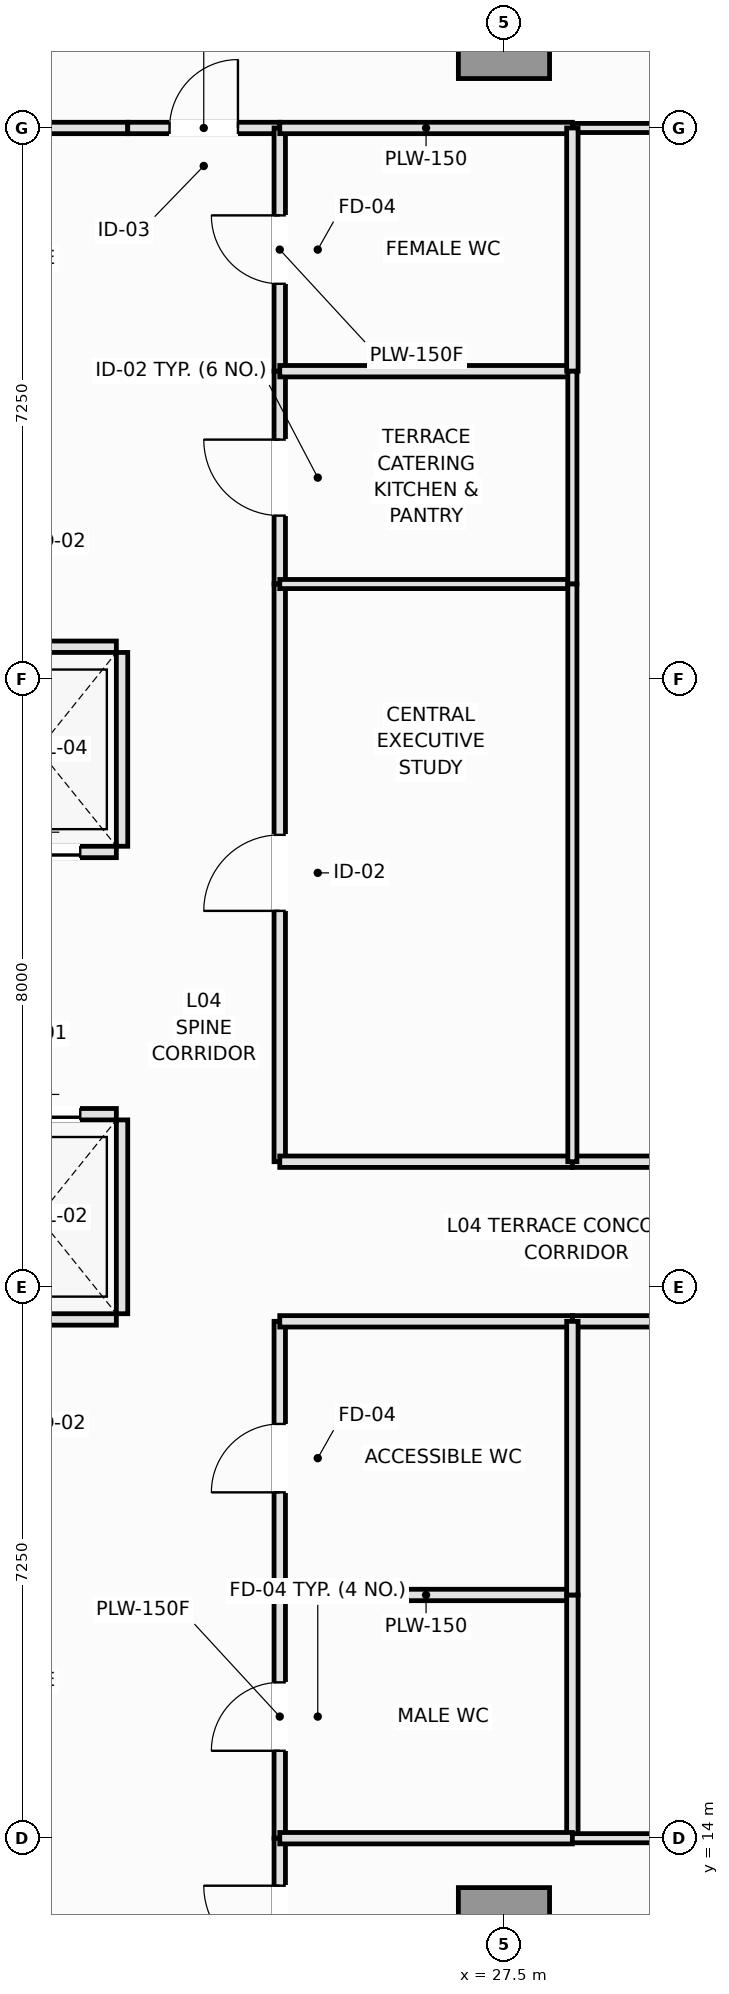
"""IFC4 building model, lengths in metres.
Left out: names, types, materials, properties, quantities, classifications, styles, units other than length and angle.
Written with IfcOpenShell. Run it as: python <this file> out.ifc"""

import sys

from ifc_helpers import new_model, si_unit, direction, frame, frame_2d, origin, origin_2d, place, context, subcontext, project, spatial, rectangle, extrude, element, fill, save


model = new_model("IFC4")
c1 = context("Model", 3, precision=1e-05, world=origin(), true_north=direction((0.0, 1.0)))
c2 = subcontext(c1, "Body", "Model", "MODEL_VIEW")
j1 = project(units=[si_unit("LENGTHUNIT", "METRE"), si_unit("PLANEANGLEUNIT", "RADIAN")], contexts=[c1])
p1 = place(None, origin())
s1 = spatial("IfcSite", under=j1, at=p1, CompositionType="ELEMENT")
p2 = place(p1, origin())
s2 = spatial("IfcBuilding", under=s1, at=p2, CompositionType="ELEMENT")
p3 = place(p2, frame((0.0, 0.0, 20.4)))
s3 = spatial("IfcBuildingStorey", under=s2, at=p3, CompositionType="ELEMENT", Elevation=20.4)
for number, where, z_axis, x_axis in (
    (1, (27.5, 12.75, 0.0), (0.0, 0.0, 1.0), (1.0, 0.0, 0.0)),
    (2, (27.5, 37.75, 0.0), (0.0, 0.0, 1.0), (1.0, 0.0, 0.0)),
):
    element("IfcColumn", number, at=place(p3, frame(where, z_axis=z_axis, x_axis=x_axis)), inside=s3, PredefinedType="COLUMN", context=c2, shape_type="SweptSolid", body=[
        extrude(rectangle(XDim=1.2, YDim=1.2, at=origin_2d()), origin(), (0.0, 0.0, 1.0), 5.2),
    ])
p4 = place(p3, frame((20.35, 20.825, 0.0), z_axis=(0.0, 0.0, 1.0), x_axis=(1.0, 0.0, 0.0)))
e3 = element("IfcWall", 3, at=p4, inside=s3, PredefinedType="PARTITIONING", context=c2, shape_type="SweptSolid", body=[
    extrude(rectangle(XDim=2.05, YDim=0.15, at=frame_2d((1.025, 0.0))), origin(), (0.0, 0.0, 1.0), 5.02),
])
p5 = place(p3, frame((20.35, 23.525, 0.0), z_axis=(0.0, 0.0, 1.0), x_axis=(1.0, 0.0, 0.0)))
e4 = element("IfcWall", 4, at=p5, inside=s3, PredefinedType="PARTITIONING", context=c2, shape_type="SweptSolid", body=[
    extrude(rectangle(XDim=2.05, YDim=0.15, at=frame_2d((1.025, 0.0))), origin(), (0.0, 0.0, 1.0), 5.02),
])
p6 = place(p5, frame((0.475, 0.0, 0.0)))
e5 = element("IfcOpeningElement", 5, at=p6, cuts=e4, PredefinedType="OPENING", context=c2, shape_type="SweptSolid", body=[
    extrude(rectangle(XDim=1.1, YDim=2.2, at=frame_2d((0.55, 1.1))), frame((0.0, 0.085, 0.0), z_axis=(0.0, -1.0, 0.0), x_axis=(1.0, 0.0, 0.0)), (0.0, 0.0, 1.0), 0.17),
])
p7 = place(p3, frame((22.475, 20.9, 0.0), z_axis=(0.0, 0.0, 1.0), x_axis=(0.0, 1.0, 0.0)))
e6 = element("IfcWall", 6, at=p7, inside=s3, PredefinedType="PARTITIONING", context=c2, shape_type="SweptSolid", body=[
    extrude(rectangle(XDim=2.55, YDim=0.15, at=frame_2d((1.275, 0.0))), origin(), (0.0, 0.0, 1.0), 4.57),
])
p8 = place(p3, frame((20.35, 26.975, 0.0), z_axis=(0.0, 0.0, 1.0), x_axis=(1.0, 0.0, 0.0)))
e7 = element("IfcWall", 7, at=p8, inside=s3, PredefinedType="PARTITIONING", context=c2, shape_type="SweptSolid", body=[
    extrude(rectangle(XDim=2.05, YDim=0.15, at=frame_2d((1.025, 0.0))), origin(), (0.0, 0.0, 1.0), 5.02),
])
p9 = place(p8, frame((0.475, 0.0, 0.0)))
e8 = element("IfcOpeningElement", 8, at=p9, cuts=e7, PredefinedType="OPENING", context=c2, shape_type="SweptSolid", body=[
    extrude(rectangle(XDim=1.1, YDim=2.2, at=frame_2d((0.55, 1.1))), frame((0.0, 0.085, 0.0), z_axis=(0.0, -1.0, 0.0), x_axis=(1.0, 0.0, 0.0)), (0.0, 0.0, 1.0), 0.17),
])
p10 = place(p3, frame((20.35, 29.675, 0.0), z_axis=(0.0, 0.0, 1.0), x_axis=(1.0, 0.0, 0.0)))
e9 = element("IfcWall", 9, at=p10, inside=s3, PredefinedType="PARTITIONING", context=c2, shape_type="SweptSolid", body=[
    extrude(rectangle(XDim=2.05, YDim=0.15, at=frame_2d((1.025, 0.0))), origin(), (0.0, 0.0, 1.0), 5.02),
])
p11 = place(p3, frame((22.475, 27.05, 0.0), z_axis=(0.0, 0.0, 1.0), x_axis=(0.0, 1.0, 0.0)))
e10 = element("IfcWall", 10, at=p11, inside=s3, PredefinedType="PARTITIONING", context=c2, shape_type="SweptSolid", body=[
    extrude(rectangle(XDim=2.55, YDim=0.15, at=frame_2d((1.275, 0.0))), origin(), (0.0, 0.0, 1.0), 4.57),
])
p12 = place(p3, frame((18.0, 36.5, 0.0), z_axis=(0.0, 0.0, 1.0), x_axis=(1.0, 0.0, 0.0)))
e11 = element("IfcWall", 11, at=p12, inside=s3, PredefinedType="PARTITIONING", context=c2, shape_type="SweptSolid", body=[
    extrude(rectangle(XDim=4.55, YDim=0.15, at=frame_2d((2.275, 0.0))), origin(), (0.0, 0.0, 1.0), 5.02),
])
p13 = place(p3, frame((22.55, 36.5, 0.0), z_axis=(0.0, 0.0, 1.0), x_axis=(1.0, 0.0, 0.0)))
e12 = element("IfcWall", 12, at=p13, inside=s3, PredefinedType="PARTITIONING", context=c2, shape_type="SweptSolid", body=[
    extrude(rectangle(XDim=2.0, YDim=0.15, at=frame_2d((1.0, 0.0))), origin(), (0.0, 0.0, 1.0), 5.02),
])
p14 = place(p13, frame((0.55, 0.0, 0.0)))
e13 = element("IfcOpeningElement", 13, at=p14, cuts=e12, PredefinedType="OPENING", context=c2, shape_type="SweptSolid", body=[
    extrude(rectangle(XDim=0.9, YDim=2.1, at=frame_2d((0.45, 1.05))), frame((0.0, 0.085, 0.0), z_axis=(0.0, -1.0, 0.0), x_axis=(1.0, 0.0, 0.0)), (0.0, 0.0, 1.0), 0.17),
])
p15 = place(p3, frame((24.55, 14.0, 0.0), z_axis=(0.0, 0.0, 1.0), x_axis=(0.0, 1.0, 0.0)))
e14 = element("IfcWall", 14, at=p15, inside=s3, PredefinedType="PLUMBINGWALL", context=c2, shape_type="SweptSolid", body=[
    extrude(rectangle(XDim=3.2, YDim=0.15, at=frame_2d((1.6, 0.0))), origin(), (0.0, 0.0, 1.0), 5.02),
])
p16 = place(p15, frame((1.15, 0.0, 0.0)))
e15 = element("IfcOpeningElement", 15, at=p16, cuts=e14, PredefinedType="OPENING", context=c2, shape_type="SweptSolid", body=[
    extrude(rectangle(XDim=0.9, YDim=2.1, at=frame_2d((0.45, 1.05))), frame((0.0, 0.085, 0.0), z_axis=(0.0, -1.0, 0.0), x_axis=(1.0, 0.0, 0.0)), (0.0, 0.0, 1.0), 0.17),
])
p17 = place(p3, frame((24.55, 33.3, 0.0), z_axis=(0.0, 0.0, 1.0), x_axis=(0.0, 1.0, 0.0)))
e16 = element("IfcWall", 16, at=p17, inside=s3, PredefinedType="PLUMBINGWALL", context=c2, shape_type="SweptSolid", body=[
    extrude(rectangle(XDim=3.2, YDim=0.15, at=frame_2d((1.6, 0.0))), origin(), (0.0, 0.0, 1.0), 5.02),
])
p18 = place(p17, frame((1.15, 0.0, 0.0)))
e17 = element("IfcOpeningElement", 17, at=p18, cuts=e16, PredefinedType="OPENING", context=c2, shape_type="SweptSolid", body=[
    extrude(rectangle(XDim=0.9, YDim=2.1, at=frame_2d((0.45, 1.05))), frame((0.0, 0.085, 0.0), z_axis=(0.0, -1.0, 0.0), x_axis=(1.0, 0.0, 0.0)), (0.0, 0.0, 1.0), 0.17),
])
p19 = place(p3, frame((24.55, 17.2, 0.0), z_axis=(0.0, 0.0, 1.0), x_axis=(0.0, 1.0, 0.0)))
e18 = element("IfcWall", 18, at=p19, inside=s3, PredefinedType="PLUMBINGWALL", context=c2, shape_type="SweptSolid", body=[
    extrude(rectangle(XDim=3.6, YDim=0.15, at=frame_2d((1.8, 0.0))), origin(), (0.0, 0.0, 1.0), 5.02),
])
p20 = place(p19, frame((1.35, 0.0, 0.0)))
e19 = element("IfcOpeningElement", 19, at=p20, cuts=e18, PredefinedType="OPENING", context=c2, shape_type="SweptSolid", body=[
    extrude(rectangle(XDim=0.9, YDim=2.1, at=frame_2d((0.45, 1.05))), frame((0.0, 0.085, 0.0), z_axis=(0.0, -1.0, 0.0), x_axis=(1.0, 0.0, 0.0)), (0.0, 0.0, 1.0), 0.17),
])
p21 = place(p3, frame((24.55, 30.5, 0.0), z_axis=(0.0, 0.0, 1.0), x_axis=(0.0, 1.0, 0.0)))
e20 = element("IfcWall", 20, at=p21, inside=s3, PredefinedType="PARTITIONING", context=c2, shape_type="SweptSolid", body=[
    extrude(rectangle(XDim=2.8, YDim=0.15, at=frame_2d((1.4, 0.0))), origin(), (0.0, 0.0, 1.0), 5.02),
])
p22 = place(p21, frame((0.9, 0.0, 0.0)))
e21 = element("IfcOpeningElement", 21, at=p22, cuts=e20, PredefinedType="OPENING", context=c2, shape_type="SweptSolid", body=[
    extrude(rectangle(XDim=1.0, YDim=2.15, at=frame_2d((0.5, 1.075))), frame((0.0, 0.085, 0.0), z_axis=(0.0, -1.0, 0.0), x_axis=(1.0, 0.0, 0.0)), (0.0, 0.0, 1.0), 0.17),
])
p23 = place(p3, frame((24.55, 22.9, 0.0), z_axis=(0.0, 0.0, 1.0), x_axis=(0.0, 1.0, 0.0)))
e22 = element("IfcWall", 22, at=p23, inside=s3, PredefinedType="PARTITIONING", context=c2, shape_type="SweptSolid", body=[
    extrude(rectangle(XDim=7.6, YDim=0.15, at=frame_2d((3.8, 0.0))), origin(), (0.0, 0.0, 1.0), 5.02),
])
p24 = place(p23, frame((3.3, 0.0, 0.0)))
e23 = element("IfcOpeningElement", 23, at=p24, cuts=e22, PredefinedType="OPENING", context=c2, shape_type="SweptSolid", body=[
    extrude(rectangle(XDim=1.0, YDim=2.15, at=frame_2d((0.5, 1.075))), frame((0.0, 0.085, 0.0), z_axis=(0.0, -1.0, 0.0), x_axis=(1.0, 0.0, 0.0)), (0.0, 0.0, 1.0), 0.17),
])
p25 = place(p3, frame((24.55, 20.8, 0.0), z_axis=(0.0, 0.0, 1.0), x_axis=(1.0, 0.0, 0.0)))
e24 = element("IfcWall", 24, at=p25, inside=s3, PredefinedType="PLUMBINGWALL", context=c2, shape_type="SweptSolid", body=[
    extrude(rectangle(XDim=3.85, YDim=0.15, at=frame_2d((1.925, 0.0))), origin(), (0.0, 0.0, 1.0), 5.02),
])
p26 = place(p3, frame((28.4, 20.8, 0.0), z_axis=(0.0, 0.0, 1.0), x_axis=(1.0, 0.0, 0.0)))
e25 = element("IfcWall", 25, at=p26, inside=s3, PredefinedType="PARTITIONING", context=c2, shape_type="SweptSolid", body=[
    extrude(rectangle(XDim=9.8, YDim=0.15, at=frame_2d((4.9, 0.0))), origin(), (0.0, 0.0, 1.0), 5.02),
])
p27 = place(p26, frame((4.4, 0.0, 0.0)))
e26 = element("IfcOpeningElement", 26, at=p27, cuts=e25, PredefinedType="OPENING", context=c2, shape_type="SweptSolid", body=[
    extrude(rectangle(XDim=1.0, YDim=2.15, at=frame_2d((0.5, 1.075))), frame((0.0, 0.085, 0.0), z_axis=(0.0, -1.0, 0.0), x_axis=(1.0, 0.0, 0.0)), (0.0, 0.0, 1.0), 0.17),
])
p28 = place(p3, frame((24.55, 22.9, 0.0), z_axis=(0.0, 0.0, 1.0), x_axis=(1.0, 0.0, 0.0)))
e27 = element("IfcWall", 27, at=p28, inside=s3, PredefinedType="PARTITIONING", context=c2, shape_type="SweptSolid", body=[
    extrude(rectangle(XDim=3.85, YDim=0.15, at=frame_2d((1.925, 0.0))), origin(), (0.0, 0.0, 1.0), 5.02),
])
p29 = place(p3, frame((28.4, 22.9, 0.0), z_axis=(0.0, 0.0, 1.0), x_axis=(1.0, 0.0, 0.0)))
e28 = element("IfcWall", 28, at=p29, inside=s3, PredefinedType="PARTITIONING", context=c2, shape_type="SweptSolid", body=[
    extrude(rectangle(XDim=9.8, YDim=0.15, at=frame_2d((4.9, 0.0))), origin(), (0.0, 0.0, 1.0), 5.02),
])
p30 = place(p29, frame((4.4, 0.0, 0.0)))
e29 = element("IfcOpeningElement", 29, at=p30, cuts=e28, PredefinedType="OPENING", context=c2, shape_type="SweptSolid", body=[
    extrude(rectangle(XDim=1.0, YDim=2.15, at=frame_2d((0.5, 1.075))), frame((0.0, 0.085, 0.0), z_axis=(0.0, -1.0, 0.0), x_axis=(1.0, 0.0, 0.0)), (0.0, 0.0, 1.0), 0.17),
])
p31 = place(p3, frame((24.55, 11.75, 0.0), z_axis=(0.0, 0.0, 1.0), x_axis=(0.0, 1.0, 0.0)))
e30 = element("IfcWall", 30, at=p31, inside=s3, PredefinedType="PARTITIONING", context=c2, shape_type="SweptSolid", body=[
    extrude(rectangle(XDim=2.25, YDim=0.15, at=frame_2d((1.125, 0.0))), origin(), (0.0, 0.0, 1.0), 5.02),
])
p32 = place(p31, frame((0.625, 0.0, 0.0)))
e31 = element("IfcOpeningElement", 31, at=p32, cuts=e30, PredefinedType="OPENING", context=c2, shape_type="SweptSolid", body=[
    extrude(rectangle(XDim=1.0, YDim=2.15, at=frame_2d((0.5, 1.075))), frame((0.0, 0.085, 0.0), z_axis=(0.0, -1.0, 0.0), x_axis=(1.0, 0.0, 0.0)), (0.0, 0.0, 1.0), 0.17),
])
p33 = place(p3, frame((24.55, 36.5, 0.0), z_axis=(0.0, 0.0, 1.0), x_axis=(1.0, 0.0, 0.0)))
e32 = element("IfcWall", 32, at=p33, inside=s3, PredefinedType="PLUMBINGWALL", context=c2, shape_type="SweptSolid", body=[
    extrude(rectangle(XDim=3.85, YDim=0.15, at=frame_2d((1.925, 0.0))), origin(), (0.0, 0.0, 1.0), 5.02),
])
p34 = place(p3, frame((28.4, 36.5, 0.0), z_axis=(0.0, 0.0, 1.0), x_axis=(1.0, 0.0, 0.0)))
e33 = element("IfcWall", 33, at=p34, inside=s3, PredefinedType="PARTITIONING", context=c2, shape_type="SweptSolid", body=[
    extrude(rectangle(XDim=9.8, YDim=0.12, at=frame_2d((4.9, 0.0))), origin(), (0.0, 0.0, 1.0), 5.02),
])
p35 = place(p3, frame((24.55, 17.2, 0.0), z_axis=(0.0, 0.0, 1.0), x_axis=(1.0, 0.0, 0.0)))
e34 = element("IfcWall", 34, at=p35, inside=s3, PredefinedType="PLUMBINGWALL", context=c2, shape_type="SweptSolid", body=[
    extrude(rectangle(XDim=3.85, YDim=0.15, at=frame_2d((1.925, 0.0))), origin(), (0.0, 0.0, 1.0), 5.02),
])
p36 = place(p3, frame((28.4, 14.0, 0.0), z_axis=(0.0, 0.0, 1.0), x_axis=(0.0, 1.0, 0.0)))
e35 = element("IfcWall", 35, at=p36, inside=s3, PredefinedType="PLUMBINGWALL", context=c2, shape_type="SweptSolid", body=[
    extrude(rectangle(XDim=3.2, YDim=0.15, at=frame_2d((1.6, 0.0))), origin(), (0.0, 0.0, 1.0), 5.02),
])
for number, where, z_axis, x_axis in (
    (36, (24.55, 14.0, 0.0), (0.0, 0.0, 1.0), (1.0, 0.0, 0.0)),
    (37, (24.55, 33.3, 0.0), (0.0, 0.0, 1.0), (1.0, 0.0, 0.0)),
):
    element("IfcWall", number, at=place(p3, frame(where, z_axis=z_axis, x_axis=x_axis)), inside=s3, PredefinedType="PLUMBINGWALL", context=c2, shape_type="SweptSolid", body=[
        extrude(rectangle(XDim=3.85, YDim=0.15, at=frame_2d((1.925, 0.0))), origin(), (0.0, 0.0, 1.0), 5.02),
    ])
p37 = place(p3, frame((28.4, 33.3, 0.0), z_axis=(0.0, 0.0, 1.0), x_axis=(0.0, 1.0, 0.0)))
e38 = element("IfcWall", 38, at=p37, inside=s3, PredefinedType="PLUMBINGWALL", context=c2, shape_type="SweptSolid", body=[
    extrude(rectangle(XDim=3.2, YDim=0.15, at=frame_2d((1.6, 0.0))), origin(), (0.0, 0.0, 1.0), 5.02),
])
p38 = place(p3, frame((28.4, 17.2, 0.0), z_axis=(0.0, 0.0, 1.0), x_axis=(0.0, 1.0, 0.0)))
e39 = element("IfcWall", 39, at=p38, inside=s3, PredefinedType="PLUMBINGWALL", context=c2, shape_type="SweptSolid", body=[
    extrude(rectangle(XDim=3.6, YDim=0.15, at=frame_2d((1.8, 0.0))), origin(), (0.0, 0.0, 1.0), 5.02),
])
p39 = place(p3, frame((24.55, 30.5, 0.0), z_axis=(0.0, 0.0, 1.0), x_axis=(1.0, 0.0, 0.0)))
e40 = element("IfcWall", 40, at=p39, inside=s3, PredefinedType="PARTITIONING", context=c2, shape_type="SweptSolid", body=[
    extrude(rectangle(XDim=3.85, YDim=0.12, at=frame_2d((1.925, 0.0))), origin(), (0.0, 0.0, 1.0), 5.02),
])
p40 = place(p3, frame((28.4, 30.5, 0.0), z_axis=(0.0, 0.0, 1.0), x_axis=(0.0, 1.0, 0.0)))
e41 = element("IfcWall", 41, at=p40, inside=s3, PredefinedType="PARTITIONING", context=c2, shape_type="SweptSolid", body=[
    extrude(rectangle(XDim=2.8, YDim=0.12, at=frame_2d((1.4, 0.0))), origin(), (0.0, 0.0, 1.0), 5.02),
])
p41 = place(p3, frame((28.4, 14.0, 0.0), z_axis=(0.0, 0.0, 1.0), x_axis=(1.0, 0.0, 0.0)))
e42 = element("IfcWall", 42, at=p41, inside=s3, PredefinedType="PARTITIONING", context=c2, shape_type="SweptSolid", body=[
    extrude(rectangle(XDim=9.8, YDim=0.12, at=frame_2d((4.9, 0.0))), origin(), (0.0, 0.0, 1.0), 5.02),
])
p42 = place(p3, frame((28.4, 22.9, 0.0), z_axis=(0.0, 0.0, 1.0), x_axis=(0.0, 1.0, 0.0)))
e43 = element("IfcWall", 43, at=p42, inside=s3, PredefinedType="PARTITIONING", context=c2, shape_type="SweptSolid", body=[
    extrude(rectangle(XDim=7.6, YDim=0.12, at=frame_2d((3.8, 0.0))), origin(), (0.0, 0.0, 1.0), 5.02),
])
p43 = place(p6, origin())
e44 = element("IfcDoor", 44, at=p43, inside=s3, OperationType="DOUBLE_DOOR_SLIDING", PredefinedType="DOOR", context=c2, shape_type="SweptSolid", body=[
    extrude(rectangle(XDim=1.1, YDim=2.2, at=frame_2d((0.55, 1.1))), frame((0.0, 0.025, 0.0), z_axis=(0.0, -1.0, 0.0), x_axis=(1.0, 0.0, 0.0)), (0.0, 0.0, 1.0), 0.05),
])
fill(e5, e44)
p44 = place(p9, origin())
e45 = element("IfcDoor", 45, at=p44, inside=s3, OperationType="DOUBLE_DOOR_SLIDING", PredefinedType="DOOR", context=c2, shape_type="SweptSolid", body=[
    extrude(rectangle(XDim=1.1, YDim=2.2, at=frame_2d((0.55, 1.1))), frame((0.0, 0.025, 0.0), z_axis=(0.0, -1.0, 0.0), x_axis=(1.0, 0.0, 0.0)), (0.0, 0.0, 1.0), 0.05),
])
fill(e8, e45)
p45 = place(p14, origin())
e46 = element("IfcDoor", 46, at=p45, inside=s3, OperationType="SINGLE_SWING_RIGHT", PredefinedType="DOOR", context=c2, shape_type="SweptSolid", body=[
    extrude(rectangle(XDim=0.9, YDim=2.1, at=frame_2d((0.45, 1.05))), frame((0.0, 0.025, 0.0), z_axis=(0.0, -1.0, 0.0), x_axis=(1.0, 0.0, 0.0)), (0.0, 0.0, 1.0), 0.05),
])
fill(e13, e46)
p46 = place(p16, origin())
e47 = element("IfcDoor", 47, at=p46, inside=s3, OperationType="SINGLE_SWING_LEFT", PredefinedType="DOOR", context=c2, shape_type="SweptSolid", body=[
    extrude(rectangle(XDim=0.9, YDim=2.1, at=frame_2d((0.45, 1.05))), frame((0.0, 0.025, 0.0), z_axis=(0.0, -1.0, 0.0), x_axis=(1.0, 0.0, 0.0)), (0.0, 0.0, 1.0), 0.05),
])
fill(e15, e47)
p47 = place(p18, origin())
e48 = element("IfcDoor", 48, at=p47, inside=s3, OperationType="SINGLE_SWING_RIGHT", PredefinedType="DOOR", context=c2, shape_type="SweptSolid", body=[
    extrude(rectangle(XDim=0.9, YDim=2.1, at=frame_2d((0.45, 1.05))), frame((0.0, 0.025, 0.0), z_axis=(0.0, -1.0, 0.0), x_axis=(1.0, 0.0, 0.0)), (0.0, 0.0, 1.0), 0.05),
])
fill(e17, e48)
p48 = place(p20, origin())
e49 = element("IfcDoor", 49, at=p48, inside=s3, OperationType="SINGLE_SWING_LEFT", PredefinedType="DOOR", context=c2, shape_type="SweptSolid", body=[
    extrude(rectangle(XDim=0.9, YDim=2.1, at=frame_2d((0.45, 1.05))), frame((0.0, 0.025, 0.0), z_axis=(0.0, -1.0, 0.0), x_axis=(1.0, 0.0, 0.0)), (0.0, 0.0, 1.0), 0.05),
])
fill(e19, e49)
p49 = place(p22, origin())
e50 = element("IfcDoor", 50, at=p49, inside=s3, OperationType="SINGLE_SWING_RIGHT", PredefinedType="DOOR", context=c2, shape_type="SweptSolid", body=[
    extrude(rectangle(XDim=1.0, YDim=2.15, at=frame_2d((0.5, 1.075))), frame((0.0, 0.025, 0.0), z_axis=(0.0, -1.0, 0.0), x_axis=(1.0, 0.0, 0.0)), (0.0, 0.0, 1.0), 0.05),
])
fill(e21, e50)
p50 = place(p24, origin())
e51 = element("IfcDoor", 51, at=p50, inside=s3, OperationType="SINGLE_SWING_LEFT", PredefinedType="DOOR", context=c2, shape_type="SweptSolid", body=[
    extrude(rectangle(XDim=1.0, YDim=2.15, at=frame_2d((0.5, 1.075))), frame((0.0, 0.025, 0.0), z_axis=(0.0, -1.0, 0.0), x_axis=(1.0, 0.0, 0.0)), (0.0, 0.0, 1.0), 0.05),
])
fill(e23, e51)
p51 = place(p32, origin())
e52 = element("IfcDoor", 52, at=p51, inside=s3, OperationType="SINGLE_SWING_RIGHT", PredefinedType="DOOR", context=c2, shape_type="SweptSolid", body=[
    extrude(rectangle(XDim=1.0, YDim=2.15, at=frame_2d((0.5, 1.075))), frame((0.0, 0.025, 0.0), z_axis=(0.0, -1.0, 0.0), x_axis=(1.0, 0.0, 0.0)), (0.0, 0.0, 1.0), 0.05),
])
fill(e31, e52)
save(model, sys.argv[1])
